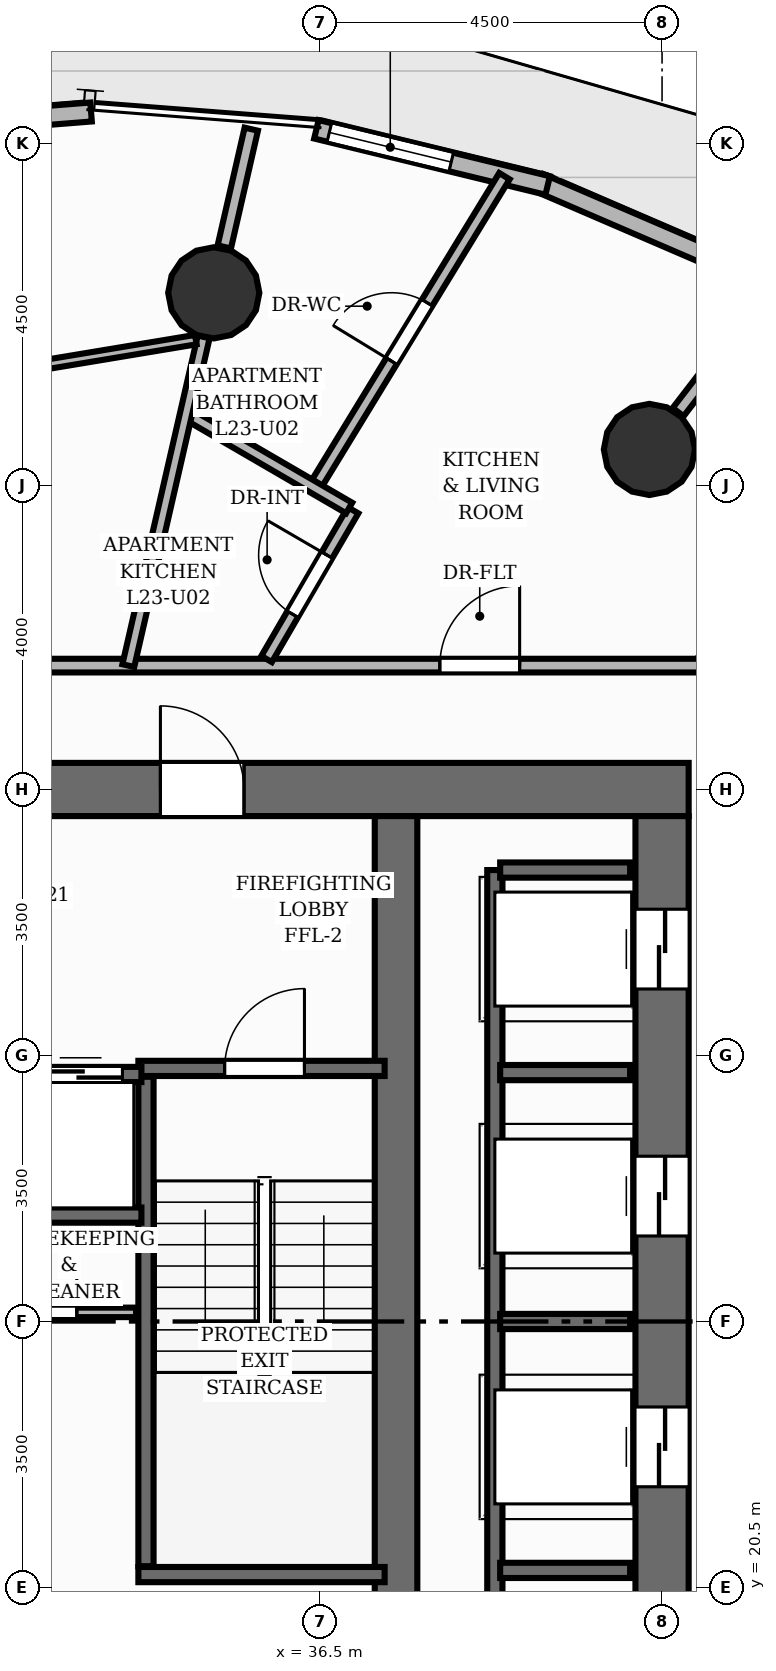
"""IFC4 building model, lengths in metres.
Left out: names, types, materials, properties, quantities, classifications, styles, units other than length and angle.
Written with IfcOpenShell. Run it as: python <this file> out.ifc"""

import sys

from ifc_helpers import new_model, si_unit, direction, frame, frame_2d, origin, origin_2d, place, context, subcontext, project, spatial, rectangle, circle, extrude, element, fill, save


model = new_model("IFC4")
c1 = context("Model", 3, precision=1e-05, world=origin(), true_north=direction((0.0, 1.0)))
c2 = subcontext(c1, "Body", "Model", "MODEL_VIEW")
j1 = project(units=[si_unit("LENGTHUNIT", "METRE"), si_unit("PLANEANGLEUNIT", "RADIAN")], contexts=[c1])
p1 = place(None, origin())
s1 = spatial("IfcSite", under=j1, at=p1, CompositionType="ELEMENT")
p2 = place(p1, origin())
s2 = spatial("IfcBuilding", under=s1, at=p2, CompositionType="ELEMENT")
p3 = place(p2, frame((0.0, 0.0, 80.48)))
s3 = spatial("IfcBuildingStorey", under=s2, at=p3, CompositionType="ELEMENT", Elevation=80.48)
p4 = place(p3, frame((22.65, 31.0, 0.0), z_axis=(0.0, 0.0, 1.0), x_axis=(1.0, 0.0, 0.0)))
e1 = element("IfcWall", 1, at=p4, inside=s3, PredefinedType="SHEAR", context=c2, shape_type="SweptSolid", body=[
    extrude(rectangle(XDim=18.7, YDim=0.7, at=frame_2d((9.35, 0.0))), origin(), (0.0, 0.0, 1.0), 3.2),
])
p5 = place(p4, frame((11.75, 0.0, 0.0)))
e2 = element("IfcOpeningElement", 2, at=p5, cuts=e1, PredefinedType="OPENING", context=c2, shape_type="SweptSolid", body=[
    extrude(rectangle(XDim=1.1, YDim=2.15, at=frame_2d((0.55, 1.075))), frame((0.0, 0.36, 0.0), z_axis=(0.0, -1.0, 0.0), x_axis=(1.0, 0.0, 0.0)), (0.0, 0.0, 1.0), 0.72),
])
p6 = place(p3, frame((41.0, 17.35, 0.0), z_axis=(0.0, 0.0, 1.0), x_axis=(0.0, 1.0, 0.0)))
e3 = element("IfcWall", 3, at=p6, inside=s3, PredefinedType="SHEAR", context=c2, shape_type="SweptSolid", body=[
    extrude(rectangle(XDim=13.3, YDim=0.7, at=frame_2d((6.65, 0.0))), origin(), (0.0, 0.0, 1.0), 3.2),
])
p7 = place(p6, frame((1.225, 0.0, 0.0)))
e4 = element("IfcOpeningElement", 4, at=p7, cuts=e3, PredefinedType="OPENING", context=c2, shape_type="SweptSolid", body=[
    extrude(rectangle(XDim=1.05, YDim=2.15, at=frame_2d((0.525, 1.075))), frame((0.0, 0.36, 0.0), z_axis=(0.0, -1.0, 0.0), x_axis=(1.0, 0.0, 0.0)), (0.0, 0.0, 1.0), 0.72),
])
p8 = place(p6, frame((4.475, 0.0, 0.0)))
e5 = element("IfcOpeningElement", 5, at=p8, cuts=e3, PredefinedType="OPENING", context=c2, shape_type="SweptSolid", body=[
    extrude(rectangle(XDim=1.05, YDim=2.15, at=frame_2d((0.525, 1.075))), frame((0.0, 0.36, 0.0), z_axis=(0.0, -1.0, 0.0), x_axis=(1.0, 0.0, 0.0)), (0.0, 0.0, 1.0), 0.72),
])
p9 = place(p6, frame((7.775, 0.0, 0.0)))
e6 = element("IfcOpeningElement", 6, at=p9, cuts=e3, PredefinedType="OPENING", context=c2, shape_type="SweptSolid", body=[
    extrude(rectangle(XDim=1.05, YDim=2.15, at=frame_2d((0.525, 1.075))), frame((0.0, 0.36, 0.0), z_axis=(0.0, -1.0, 0.0), x_axis=(1.0, 0.0, 0.0)), (0.0, 0.0, 1.0), 0.72),
])
p10 = place(p6, frame((11.025, 0.0, 0.0)))
e7 = element("IfcOpeningElement", 7, at=p10, cuts=e3, PredefinedType="OPENING", context=c2, shape_type="SweptSolid", body=[
    extrude(rectangle(XDim=1.05, YDim=2.15, at=frame_2d((0.525, 1.075))), frame((0.0, 0.36, 0.0), z_axis=(0.0, -1.0, 0.0), x_axis=(1.0, 0.0, 0.0)), (0.0, 0.0, 1.0), 0.72),
])
p11 = place(p3, frame((37.5, 17.35, 0.0), z_axis=(0.0, 0.0, 1.0), x_axis=(0.0, 1.0, 0.0)))
e8 = element("IfcWall", 8, at=p11, inside=s3, PredefinedType="SHEAR", context=c2, shape_type="SweptSolid", body=[
    extrude(rectangle(XDim=13.3, YDim=0.56, at=frame_2d((6.65, 0.0))), origin(), (0.0, 0.0, 1.0), 3.2),
])
for number, where, z_axis, x_axis in (
    (9, (40.833, 35.474, 0.0), (0.0, 0.0, 1.0), (1.0, 0.0, 0.0)),
    (10, (35.102, 37.535, 0.0), (0.0, 0.0, 1.0), (1.0, 0.0, 0.0)),
):
    element("IfcColumn", number, at=place(p3, frame(where, z_axis=z_axis, x_axis=x_axis)), inside=s3, PredefinedType="COLUMN", context=c2, shape_type="SweptSolid", body=[
        extrude(circle(Radius=0.6, at=origin_2d()), origin(), (0.0, 0.0, 1.0), 3.2),
    ])
p12 = place(p3, frame((39.39, 38.982, 0.0), z_axis=(0.0, 0.0, 1.0), x_axis=(0.91829708806, -0.395891977766, 0.0)))
e11 = element("IfcWall", 11, at=p12, inside=s3, PredefinedType="SOLIDWALL", context=c2, shape_type="SweptSolid", body=[
    extrude(rectangle(XDim=3.061, YDim=0.25, at=frame_2d((1.53, 0.0))), origin(), (0.0, 0.0, 1.0), 2.96),
])
p13 = place(p3, frame((36.452, 39.687, 0.0), z_axis=(0.0, 0.0, 1.0), x_axis=(0.971748850292, -0.236017312833, 0.0)))
e12 = element("IfcWall", 12, at=p13, inside=s3, PredefinedType="SOLIDWALL", context=c2, shape_type="SweptSolid", body=[
    extrude(rectangle(XDim=3.131, YDim=0.25, at=frame_2d((1.565, 0.0))), origin(), (0.0, 0.0, 1.0), 2.96),
])
p14 = place(p13, frame((0.175, 0.0, 0.85)))
e13 = element("IfcOpeningElement", 13, at=p14, cuts=e12, PredefinedType="OPENING", context=c2, shape_type="SweptSolid", body=[
    extrude(rectangle(XDim=1.65, YDim=1.55, at=frame_2d((0.825, 0.775))), frame((0.0, 0.135, 0.0), z_axis=(0.0, -1.0, 0.0), x_axis=(1.0, 0.0, 0.0)), (0.0, 0.0, 1.0), 0.27),
])
p15 = place(p3, frame((30.262, 39.658, 0.0), z_axis=(0.0, 0.0, 1.0), x_axis=(0.996851873062, 0.079286462736, 0.0)))
e14 = element("IfcWall", 14, at=p15, inside=s3, PredefinedType="SOLIDWALL", context=c2, shape_type="SweptSolid", body=[
    extrude(rectangle(XDim=3.236, YDim=0.25, at=frame_2d((1.618, 0.0))), origin(), (0.0, 0.0, 1.0), 2.96),
])
p16 = place(p15, frame((0.918, 0.0, 0.85)))
e15 = element("IfcOpeningElement", 15, at=p16, cuts=e14, PredefinedType="OPENING", context=c2, shape_type="SweptSolid", body=[
    extrude(rectangle(XDim=1.4, YDim=1.55, at=frame_2d((0.7, 0.775))), frame((0.0, 0.135, 0.0), z_axis=(0.0, -1.0, 0.0), x_axis=(1.0, 0.0, 0.0)), (0.0, 0.0, 1.0), 0.27),
])
p17 = place(p3, frame((34.21, 20.78, 0.0), z_axis=(0.0, 0.0, 1.0), x_axis=(0.0, 1.0, 0.0)))
e16 = element("IfcWall", 16, at=p17, inside=s3, PredefinedType="SHEAR", context=c2, shape_type="SweptSolid", body=[
    extrude(rectangle(XDim=6.44, YDim=0.2, at=frame_2d((3.22, 0.0))), origin(), (0.0, 0.0, 1.0), 3.2),
])
p18 = place(p3, frame((34.11, 20.67, 0.0), z_axis=(0.0, 0.0, 1.0), x_axis=(1.0, 0.0, 0.0)))
e17 = element("IfcWall", 17, at=p18, inside=s3, PredefinedType="SHEAR", context=c2, shape_type="SweptSolid", body=[
    extrude(rectangle(XDim=3.24, YDim=0.2, at=frame_2d((1.62, 0.0))), origin(), (0.0, 0.0, 1.0), 3.2),
])
p19 = place(p3, frame((34.11, 27.33, 0.0), z_axis=(0.0, 0.0, 1.0), x_axis=(1.0, 0.0, 0.0)))
e18 = element("IfcWall", 18, at=p19, inside=s3, PredefinedType="SHEAR", context=c2, shape_type="SweptSolid", body=[
    extrude(rectangle(XDim=3.24, YDim=0.2, at=frame_2d((1.62, 0.0))), origin(), (0.0, 0.0, 1.0), 3.2),
])
p20 = place(p19, frame((1.135, 0.0, 0.0)))
e19 = element("IfcOpeningElement", 19, at=p20, cuts=e18, PredefinedType="OPENING", context=c2, shape_type="SweptSolid", body=[
    extrude(rectangle(XDim=1.05, YDim=2.15, at=frame_2d((0.525, 1.075))), frame((0.0, 0.11, 0.0), z_axis=(0.0, -1.0, 0.0), x_axis=(1.0, 0.0, 0.0)), (0.0, 0.0, 1.0), 0.22),
])
p21 = place(p3, frame((31.85, 27.25, 0.0), z_axis=(0.0, 0.0, 1.0), x_axis=(1.0, 0.0, 0.0)))
e20 = element("IfcWall", 20, at=p21, inside=s3, PredefinedType="SHEAR", context=c2, shape_type="SweptSolid", body=[
    extrude(rectangle(XDim=2.3, YDim=0.2, at=frame_2d((1.15, 0.0))), origin(), (0.0, 0.0, 1.0), 3.2),
])
p22 = place(p21, frame((0.95, 0.0, 0.0)))
e21 = element("IfcOpeningElement", 21, at=p22, cuts=e20, PredefinedType="OPENING", context=c2, shape_type="SweptSolid", body=[
    extrude(rectangle(XDim=1.1, YDim=2.15, at=frame_2d((0.55, 1.075))), frame((0.0, 0.11, 0.0), z_axis=(0.0, -1.0, 0.0), x_axis=(1.0, 0.0, 0.0)), (0.0, 0.0, 1.0), 0.22),
])
p23 = place(p3, frame((31.85, 25.4, 0.0), z_axis=(0.0, 0.0, 1.0), x_axis=(1.0, 0.0, 0.0)))
e22 = element("IfcWall", 22, at=p23, inside=s3, PredefinedType="SHEAR", context=c2, shape_type="SweptSolid", body=[
    extrude(rectangle(XDim=2.3, YDim=0.2, at=frame_2d((1.15, 0.0))), origin(), (0.0, 0.0, 1.0), 3.2),
])
p24 = place(p3, frame((38.8, 18.06, 0.0), z_axis=(0.0, 0.0, 1.0), x_axis=(0.0, 1.0, 0.0)))
e23 = element("IfcWall", 23, at=p24, inside=s3, PredefinedType="SHEAR", context=c2, shape_type="SweptSolid", body=[
    extrude(rectangle(XDim=11.88, YDim=0.2, at=frame_2d((5.94, 0.0))), origin(), (0.0, 0.0, 1.0), 3.2),
])
for number, where, z_axis, x_axis in (
    (24, (38.87, 29.94, 0.0), (0.0, 0.0, 1.0), (1.0, 0.0, 0.0)),
    (25, (38.87, 20.725, 0.0), (0.0, 0.0, 1.0), (1.0, 0.0, 0.0)),
    (26, (38.87, 24.0, 0.0), (0.0, 0.0, 1.0), (1.0, 0.0, 0.0)),
    (27, (38.87, 27.275, 0.0), (0.0, 0.0, 1.0), (1.0, 0.0, 0.0)),
):
    element("IfcWall", number, at=place(p3, frame(where, z_axis=z_axis, x_axis=x_axis)), inside=s3, PredefinedType="SHEAR", context=c2, shape_type="SweptSolid", body=[
        extrude(rectangle(XDim=1.71, YDim=0.2, at=frame_2d((0.855, 0.0))), origin(), (0.0, 0.0, 1.0), 3.2),
    ])
p25 = place(p3, frame((31.76, 24.12, 0.0), z_axis=(0.0, 0.0, 1.0), x_axis=(1.0, 0.0, 0.0)))
e28 = element("IfcWall", 28, at=p25, inside=s3, PredefinedType="PARTITIONING", context=c2, shape_type="SweptSolid", body=[
    extrude(rectangle(XDim=2.32, YDim=0.125, at=frame_2d((1.16, 0.0))), origin(), (0.0, 0.0, 1.0), 2.955),
])
p26 = place(p25, frame((0.64, 0.0, 0.0)))
e29 = element("IfcOpeningElement", 29, at=p26, cuts=e28, PredefinedType="OPENING", context=c2, shape_type="SweptSolid", body=[
    extrude(rectangle(XDim=0.9, YDim=2.1, at=frame_2d((0.45, 1.05))), frame((0.0, 0.073, 0.0), z_axis=(0.0, -1.0, 0.0), x_axis=(1.0, 0.0, 0.0)), (0.0, 0.0, 1.0), 0.145),
])
p27 = place(p3, frame((41.212, 35.966, 0.0), z_axis=(0.0, 0.0, 1.0), x_axis=(0.609995088008, 0.792405194712, 0.0)))
e30 = element("IfcWall", 30, at=p27, inside=s3, PredefinedType="PARTITIONING", context=c2, shape_type="SweptSolid", body=[
    extrude(rectangle(XDim=1.991, YDim=0.18, at=frame_2d((0.996, 0.0))), origin(), (0.0, 0.0, 1.0), 2.26),
])
p28 = place(p3, frame((35.24, 38.139, 0.0), z_axis=(0.0, 0.0, 1.0), x_axis=(0.223333591652, 0.974742071955, 0.0)))
e31 = element("IfcWall", 31, at=p28, inside=s3, PredefinedType="PARTITIONING", context=c2, shape_type="SweptSolid", body=[
    extrude(rectangle(XDim=1.589, YDim=0.18, at=frame_2d((0.795, 0.0))), origin(), (0.0, 0.0, 1.0), 2.26),
])
p29 = place(p3, frame((26.431, 32.63, 0.0), z_axis=(0.0, 0.0, 1.0), x_axis=(1.0, 0.0, 0.0)))
e32 = element("IfcWall", 32, at=p29, inside=s3, PredefinedType="PARTITIONING", context=c2, shape_type="SweptSolid", body=[
    extrude(rectangle(XDim=16.199, YDim=0.18, at=frame_2d((8.099, 0.0))), origin(), (0.0, 0.0, 1.0), 2.955),
])
p30 = place(p29, frame((11.645, 0.0, 0.0)))
e33 = element("IfcOpeningElement", 33, at=p30, cuts=e32, PredefinedType="OPENING", context=c2, shape_type="SweptSolid", body=[
    extrude(rectangle(XDim=1.05, YDim=2.15, at=frame_2d((0.525, 1.075))), frame((0.0, 0.1, 0.0), z_axis=(0.0, -1.0, 0.0), x_axis=(1.0, 0.0, 0.0)), (0.0, 0.0, 1.0), 0.2),
])
p31 = place(p3, frame((36.424, 34.971, 0.0), z_axis=(0.0, 0.0, 1.0), x_axis=(0.521036660125, 0.853534298553, 0.0)))
e34 = element("IfcWall", 34, at=p31, inside=s3, PredefinedType="PLUMBINGWALL", context=c2, shape_type="SweptSolid", body=[
    extrude(rectangle(XDim=4.803, YDim=0.16, at=frame_2d((2.401, 0.0))), origin(), (0.0, 0.0, 1.0), 2.641),
])
p32 = place(p31, frame((1.951, 0.0, 0.0)))
e35 = element("IfcOpeningElement", 35, at=p32, cuts=e34, PredefinedType="OPENING", context=c2, shape_type="SweptSolid", body=[
    extrude(rectangle(XDim=0.9, YDim=2.1, at=frame_2d((0.45, 1.05))), frame((0.0, 0.09, 0.0), z_axis=(0.0, -1.0, 0.0), x_axis=(1.0, 0.0, 0.0)), (0.0, 0.0, 1.0), 0.18),
])
p33 = place(p3, frame((35.797, 32.716, 0.0), z_axis=(0.0, 0.0, 1.0), x_axis=(0.50256985659, 0.864536603763, 0.0)))
e36 = element("IfcWall", 36, at=p33, inside=s3, PredefinedType="PLUMBINGWALL", context=c2, shape_type="SweptSolid", body=[
    extrude(rectangle(XDim=2.264, YDim=0.16, at=frame_2d((1.132, 0.0))), origin(), (0.0, 0.0, 1.0), 2.955),
])
p34 = place(p33, frame((0.682, 0.0, 0.0)))
e37 = element("IfcOpeningElement", 37, at=p34, cuts=e36, PredefinedType="OPENING", context=c2, shape_type="SweptSolid", body=[
    extrude(rectangle(XDim=0.9, YDim=2.1, at=frame_2d((0.45, 1.05))), frame((0.0, 0.09, 0.0), z_axis=(0.0, -1.0, 0.0), x_axis=(1.0, 0.0, 0.0)), (0.0, 0.0, 1.0), 0.18),
])
p35 = place(p3, frame((36.883, 34.704, 0.0), z_axis=(0.0, 0.0, 1.0), x_axis=(-0.864542002386, 0.502560569594, 0.0)))
e38 = element("IfcWall", 38, at=p35, inside=s3, PredefinedType="PLUMBINGWALL", context=c2, shape_type="SweptSolid", body=[
    extrude(rectangle(XDim=2.48, YDim=0.16, at=frame_2d((1.24, 0.0))), origin(), (0.0, 0.0, 1.0), 2.955),
])
p36 = place(p3, frame((33.978, 32.63, 0.0), z_axis=(0.0, 0.0, 1.0), x_axis=(0.223368533365, 0.974734065426, 0.0)))
e39 = element("IfcWall", 39, at=p36, inside=s3, PredefinedType="PLUMBINGWALL", context=c2, shape_type="SweptSolid", body=[
    extrude(rectangle(XDim=4.438, YDim=0.16, at=frame_2d((2.219, 0.0))), origin(), (0.0, 0.0, 1.0), 2.26),
])
p37 = place(p3, frame((24.875, 35.259, 0.0), z_axis=(0.0, 0.0, 1.0), x_axis=(0.986466792703, 0.163961174958, 0.0)))
e40 = element("IfcWall", 40, at=p37, inside=s3, PredefinedType="PARTITIONING", context=c2, shape_type="SweptSolid", body=[
    extrude(rectangle(XDim=10.128, YDim=0.125, at=frame_2d((5.064, 0.0))), origin(), (0.0, 0.0, 1.0), 2.955),
])
p38 = place(p37, frame((5.034, 0.0, 0.0)))
e41 = element("IfcOpeningElement", 41, at=p38, cuts=e40, PredefinedType="OPENING", context=c2, shape_type="SweptSolid", body=[
    extrude(rectangle(XDim=0.9, YDim=2.1, at=frame_2d((0.45, 1.05))), frame((0.0, 0.073, 0.0), z_axis=(0.0, -1.0, 0.0), x_axis=(1.0, 0.0, 0.0)), (0.0, 0.0, 1.0), 0.145),
])
p39 = place(p14, origin())
e42 = element("IfcWindow", 42, at=p39, inside=s3, PartitioningType="SINGLE_PANEL", PredefinedType="WINDOW", context=c2, shape_type="SweptSolid", body=[
    extrude(rectangle(XDim=1.65, YDim=1.55, at=frame_2d((0.825, 0.775))), frame((0.0, 0.03, 0.0), z_axis=(0.0, -1.0, 0.0), x_axis=(1.0, 0.0, 0.0)), (0.0, 0.0, 1.0), 0.06),
])
fill(e13, e42)
p40 = place(p20, origin())
e43 = element("IfcDoor", 43, at=p40, inside=s3, OperationType="SINGLE_SWING_RIGHT", PredefinedType="DOOR", context=c2, shape_type="SweptSolid", body=[
    extrude(rectangle(XDim=1.05, YDim=2.15, at=frame_2d((0.525, 1.075))), frame((0.0, 0.025, 0.0), z_axis=(0.0, -1.0, 0.0), x_axis=(1.0, 0.0, 0.0)), (0.0, 0.0, 1.0), 0.05),
])
fill(e19, e43)
p41 = place(p5, origin())
e44 = element("IfcDoor", 44, at=p41, inside=s3, OperationType="SINGLE_SWING_LEFT", PredefinedType="DOOR", context=c2, shape_type="SweptSolid", body=[
    extrude(rectangle(XDim=1.1, YDim=2.15, at=frame_2d((0.55, 1.075))), frame((0.0, 0.025, 0.0), z_axis=(0.0, -1.0, 0.0), x_axis=(1.0, 0.0, 0.0)), (0.0, 0.0, 1.0), 0.05),
])
fill(e2, e44)
p42 = place(p22, origin())
e45 = element("IfcDoor", 45, at=p42, inside=s3, OperationType="DOUBLE_DOOR_SLIDING", PredefinedType="DOOR", context=c2, shape_type="SweptSolid", body=[
    extrude(rectangle(XDim=1.1, YDim=2.15, at=frame_2d((0.55, 1.075))), frame((0.0, 0.025, 0.0), z_axis=(0.0, -1.0, 0.0), x_axis=(1.0, 0.0, 0.0)), (0.0, 0.0, 1.0), 0.05),
])
fill(e21, e45)
p43 = place(p8, origin())
e46 = element("IfcDoor", 46, at=p43, inside=s3, OperationType="DOUBLE_DOOR_SLIDING", PredefinedType="DOOR", context=c2, shape_type="SweptSolid", body=[
    extrude(rectangle(XDim=1.05, YDim=2.15, at=frame_2d((0.525, 1.075))), frame((0.0, 0.025, 0.0), z_axis=(0.0, -1.0, 0.0), x_axis=(1.0, 0.0, 0.0)), (0.0, 0.0, 1.0), 0.05),
])
fill(e5, e46)
p44 = place(p9, origin())
e47 = element("IfcDoor", 47, at=p44, inside=s3, OperationType="DOUBLE_DOOR_SLIDING", PredefinedType="DOOR", context=c2, shape_type="SweptSolid", body=[
    extrude(rectangle(XDim=1.05, YDim=2.15, at=frame_2d((0.525, 1.075))), frame((0.0, 0.025, 0.0), z_axis=(0.0, -1.0, 0.0), x_axis=(1.0, 0.0, 0.0)), (0.0, 0.0, 1.0), 0.05),
])
fill(e6, e47)
p45 = place(p10, origin())
e48 = element("IfcDoor", 48, at=p45, inside=s3, OperationType="DOUBLE_DOOR_SLIDING", PredefinedType="DOOR", context=c2, shape_type="SweptSolid", body=[
    extrude(rectangle(XDim=1.05, YDim=2.15, at=frame_2d((0.525, 1.075))), frame((0.0, 0.025, 0.0), z_axis=(0.0, -1.0, 0.0), x_axis=(1.0, 0.0, 0.0)), (0.0, 0.0, 1.0), 0.05),
])
fill(e7, e48)
p46 = place(p26, origin())
e49 = element("IfcDoor", 49, at=p46, inside=s3, OperationType="SINGLE_SWING_RIGHT", PredefinedType="DOOR", context=c2, shape_type="SweptSolid", body=[
    extrude(rectangle(XDim=0.9, YDim=2.1, at=frame_2d((0.45, 1.05))), frame((0.0, 0.025, 0.0), z_axis=(0.0, -1.0, 0.0), x_axis=(1.0, 0.0, 0.0)), (0.0, 0.0, 1.0), 0.05),
])
fill(e29, e49)
p47 = place(p30, origin())
e50 = element("IfcDoor", 50, at=p47, inside=s3, OperationType="SINGLE_SWING_RIGHT", PredefinedType="DOOR", context=c2, shape_type="SweptSolid", body=[
    extrude(rectangle(XDim=1.05, YDim=2.15, at=frame_2d((0.525, 1.075))), frame((0.0, 0.025, 0.0), z_axis=(0.0, -1.0, 0.0), x_axis=(1.0, 0.0, 0.0)), (0.0, 0.0, 1.0), 0.05),
])
fill(e33, e50)
p48 = place(p32, origin())
e51 = element("IfcDoor", 51, at=p48, inside=s3, OperationType="SINGLE_SWING_LEFT", PredefinedType="DOOR", context=c2, shape_type="SweptSolid", body=[
    extrude(rectangle(XDim=0.9, YDim=2.1, at=frame_2d((0.45, 1.05))), frame((0.0, 0.025, 0.0), z_axis=(0.0, -1.0, 0.0), x_axis=(1.0, 0.0, 0.0)), (0.0, 0.0, 1.0), 0.05),
])
fill(e35, e51)
p49 = place(p34, origin())
e52 = element("IfcDoor", 52, at=p49, inside=s3, OperationType="SINGLE_SWING_RIGHT", PredefinedType="DOOR", context=c2, shape_type="SweptSolid", body=[
    extrude(rectangle(XDim=0.9, YDim=2.1, at=frame_2d((0.45, 1.05))), frame((0.0, 0.025, 0.0), z_axis=(0.0, -1.0, 0.0), x_axis=(1.0, 0.0, 0.0)), (0.0, 0.0, 1.0), 0.05),
])
fill(e37, e52)
save(model, sys.argv[1])
